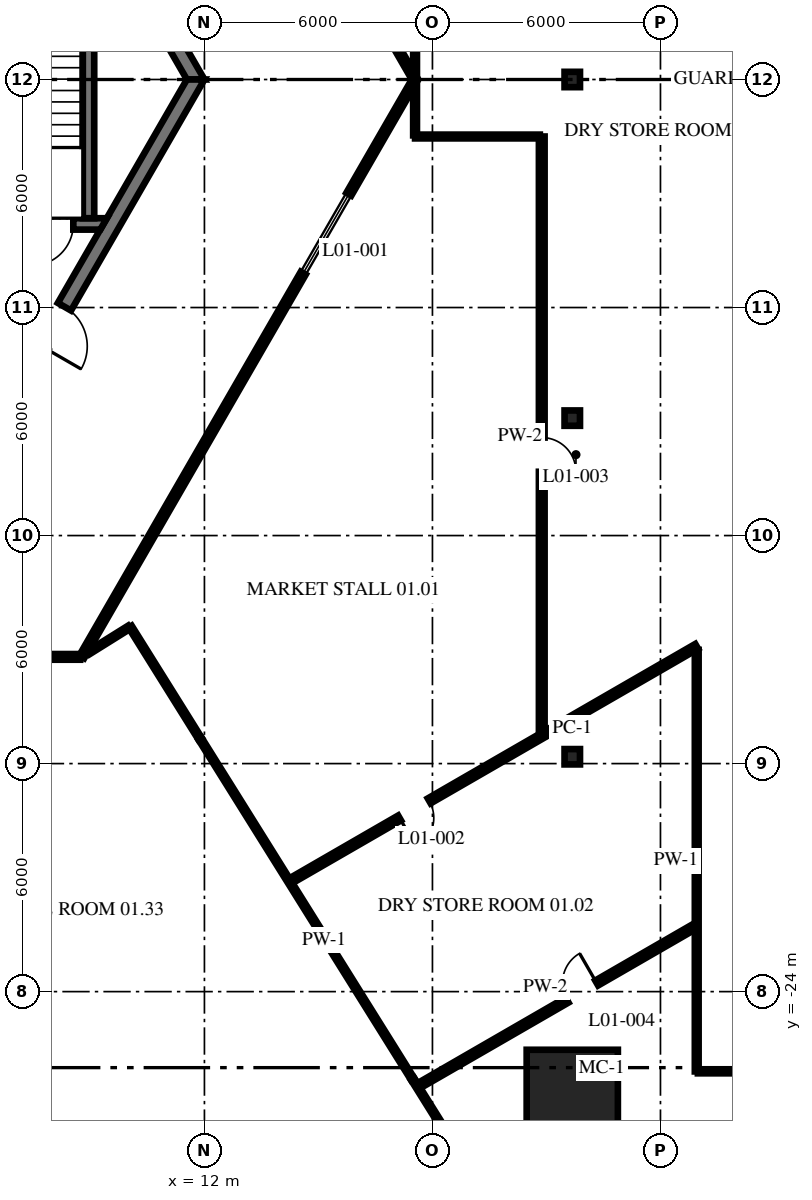
"""IFC4 building model, lengths in metres.
Left out: names, types, materials, properties, quantities, classifications, styles, units other than length and angle.
Written with IfcOpenShell. Run it as: python <this file> out.ifc"""

import sys

from ifc_helpers import new_model, si_unit, direction, frame, frame_2d, origin, origin_2d, place, context, subcontext, project, spatial, polyline, rectangle, i_section, outline, extrude, source, transform, mapped, element, fill, save


model = new_model("IFC4")
c1 = context("Model", 3, precision=1e-05, world=origin(), true_north=direction((0.0, 1.0)))
c2 = subcontext(c1, "Body", "Model", "MODEL_VIEW")
j1 = project(units=[si_unit("LENGTHUNIT", "METRE"), si_unit("PLANEANGLEUNIT", "RADIAN")], contexts=[c1])
p1 = place(None, origin())
s1 = spatial("IfcSite", under=j1, at=p1, CompositionType="ELEMENT")
p2 = place(p1, origin())
s2 = spatial("IfcBuilding", under=s1, at=p2, CompositionType="ELEMENT")
p3 = place(p2, frame((0.0, 0.0, 7.0)))
s3 = spatial("IfcBuildingStorey", under=s2, at=p3, CompositionType="ELEMENT", Elevation=7.0)
m1 = source(origin(), c2, "Body", "SweptSolid", [
    extrude(rectangle(XDim=2.4, YDim=2.4, at=origin_2d()), origin(), (0.0, 0.0, 1.0), 4.5),
])
p4 = place(p3, frame((21.679, -26.73, 0.0), z_axis=(0.0, 0.0, 1.0), x_axis=(0.0, 1.0, 0.0)))
e1 = element("IfcColumn", 1, at=p4, inside=s3, PredefinedType="COLUMN", context=c2, shape_type="MappedRepresentation", body=[
    mapped(m1, transform((0.0, 0.0, 0.0), scale=1.0)),
])
m2 = source(origin(), c2, "Body", "SweptSolid", [
    extrude(i_section(OverallWidth=0.404, OverallDepth=0.406, WebThickness=0.027, FlangeThickness=0.044, at=origin_2d()), origin(), (0.0, 0.0, 1.0), 4.5),
])
for number, where, z_axis, x_axis in (
    (2, (21.679, -17.82, 0.0), (0.0, 0.0, 1.0), (0.0, 1.0, 0.0)),
    (3, (21.679, -8.91, 0.0), (0.0, 0.0, 1.0), (0.0, 1.0, 0.0)),
    (4, (21.679, 0.0, 0.0), (0.0, 0.0, 1.0), (0.0, 1.0, 0.0)),
):
    element("IfcColumn", number, at=place(p3, frame(where, z_axis=z_axis, x_axis=x_axis)), inside=s3, PredefinedType="COLUMN", context=c2, shape_type="MappedRepresentation", body=[
        mapped(m2, transform((0.0, 0.0, 0.0), scale=1.0)),
    ])
m3 = source(origin(), c2, "Body", "SweptSolid", [
    extrude(outline(polyline([(-0.115, -0.2), (11.885, -0.2), (11.654, 0.2), (0.115, 0.2), (-0.115, -0.2)])), origin(), (0.0, 0.0, 1.0), 4.3),
])
p5 = place(p3, frame((11.769, 0.0, 0.0), z_axis=(0.0, 0.0, 1.0), x_axis=(-0.499996592174, 0.866027371285, 0.0)))
e5 = element("IfcWall", 5, at=p5, inside=s3, PredefinedType="SHEAR", context=c2, shape_type="MappedRepresentation", body=[
    mapped(m3, transform((0.0, 0.0, 0.0), scale=1.0)),
])
p6 = place(p5, frame((5.75, 0.0, 0.0)))
e6 = element("IfcOpeningElement", 6, at=p6, cuts=e5, PredefinedType="OPENING", context=c2, shape_type="SweptSolid", body=[
    extrude(rectangle(XDim=1.2, YDim=2.1, at=frame_2d((0.6, 1.05))), frame((0.0, 0.21, 0.0), z_axis=(0.0, -1.0, 0.0), x_axis=(1.0, 0.0, 0.0)), (0.0, 0.0, 1.0), 0.42),
])
p7 = place(p3, frame((5.885, -10.192, 0.0), z_axis=(0.0, 0.0, 1.0), x_axis=(0.499996592174, 0.866027371285, 0.0)))
e7 = element("IfcWall", 7, at=p7, inside=s3, PredefinedType="SHEAR", context=c2, shape_type="MappedRepresentation", body=[
    mapped(m3, transform((0.0, 0.0, 0.0), scale=1.0)),
])
p8 = place(p7, frame((3.665, 0.0, 0.0)))
e8 = element("IfcOpeningElement", 8, at=p8, cuts=e7, PredefinedType="OPENING", context=c2, shape_type="SweptSolid", body=[
    extrude(rectangle(XDim=1.2, YDim=2.1, at=frame_2d((0.6, 1.05))), frame((0.0, 0.21, 0.0), z_axis=(0.0, -1.0, 0.0), x_axis=(1.0, 0.0, 0.0)), (0.0, 0.0, 1.0), 0.42),
])
m4 = source(origin(), c2, "Body", "SweptSolid", [
    extrude(outline(polyline([(0.0, -0.15), (0.0, 0.15), (4.433, 0.15), (4.26, -0.15), (0.0, -0.15)])), origin(), (0.0, 0.0, 1.0), 4.3),
])
p9 = place(p3, frame((5.0, -3.8, 0.0), z_axis=(0.0, 0.0, 1.0), x_axis=(1.0, 0.0, 0.0)))
e9 = element("IfcWall", 9, at=p9, inside=s3, PredefinedType="SHEAR", context=c2, shape_type="MappedRepresentation", body=[
    mapped(m4, transform((0.0, 0.0, 0.0), scale=1.0)),
])
p10 = place(p9, frame((2.45, 0.0, 0.0)))
e10 = element("IfcOpeningElement", 10, at=p10, cuts=e9, PredefinedType="OPENING", context=c2, shape_type="SweptSolid", body=[
    extrude(rectangle(XDim=1.1, YDim=2.1, at=frame_2d((0.55, 1.05))), frame((0.0, 0.16, 0.0), z_axis=(0.0, -1.0, 0.0), x_axis=(1.0, 0.0, 0.0)), (0.0, 0.0, 1.0), 0.32),
])
m5 = source(origin(), c2, "Body", "SweptSolid", [
    extrude(rectangle(XDim=7.3, YDim=0.3, at=frame_2d((3.65, 0.0))), origin(), (0.0, 0.0, 1.0), 4.3),
])
p11 = place(p3, frame((8.95, -3.65, 0.0), z_axis=(0.0, 0.0, 1.0), x_axis=(0.0, 1.0, 0.0)))
e11 = element("IfcWall", 11, at=p11, inside=s3, PredefinedType="SHEAR", context=c2, shape_type="MappedRepresentation", body=[
    mapped(m5, transform((0.0, 0.0, 0.0), scale=1.0)),
])
p12 = place(p3, frame((8.792, 15.156, 0.0), z_axis=(0.0, 0.0, 1.0), x_axis=(0.499996830835, -0.866027233495, 0.0)))
e12 = element("IfcWall", 12, at=p12, inside=s3, PredefinedType="PARTITIONING", context=c2, shape_type="SweptSolid", body=[
    extrude(rectangle(XDim=17.458, YDim=0.15, at=frame_2d((8.729, 0.0))), origin(), (0.0, 0.0, 1.0), 4.3),
])
p13 = place(p12, frame((11.551, 0.0, 0.0)))
e13 = element("IfcOpeningElement", 13, at=p13, cuts=e12, PredefinedType="OPENING", context=c2, shape_type="SweptSolid", body=[
    extrude(rectangle(XDim=2.4, YDim=2.4, at=frame_2d((1.2, 1.2))), frame((0.0, 0.085, 0.0), z_axis=(0.0, -1.0, 0.0), x_axis=(1.0, 0.0, 0.0)), (0.0, 0.0, 1.0), 0.17),
])
p14 = place(p12, frame((2.014, 0.0, 0.0)))
e14 = element("IfcOpeningElement", 14, at=p14, cuts=e12, PredefinedType="OPENING", context=c2, shape_type="SweptSolid", body=[
    extrude(rectangle(XDim=0.9, YDim=2.1, at=frame_2d((0.45, 1.05))), frame((0.0, 0.085, 0.0), z_axis=(0.0, -1.0, 0.0), x_axis=(1.0, 0.0, 0.0)), (0.0, 0.0, 1.0), 0.17),
])
p15 = place(p12, frame((6.117, 0.0, 0.0)))
e15 = element("IfcOpeningElement", 15, at=p15, cuts=e12, PredefinedType="OPENING", context=c2, shape_type="SweptSolid", body=[
    extrude(rectangle(XDim=0.9, YDim=2.1, at=frame_2d((0.45, 1.05))), frame((0.0, 0.085, 0.0), z_axis=(0.0, -1.0, 0.0), x_axis=(1.0, 0.0, 0.0)), (0.0, 0.0, 1.0), 0.17),
])
p16 = place(p3, frame((10.043, -14.398, 0.0), z_axis=(0.0, 0.0, 1.0), x_axis=(0.529778164717, -0.8481362486, 0.0)))
e16 = element("IfcWall", 16, at=p16, inside=s3, PredefinedType="PARTITIONING", context=c2, shape_type="SweptSolid", body=[
    extrude(rectangle(XDim=3.479, YDim=0.1, at=frame_2d((1.74, 0.0))), origin(), (0.0, 0.0, 1.0), 4.3),
])
p17 = place(p3, frame((11.887, -17.349, 0.0), z_axis=(0.0, 0.0, 1.0), x_axis=(0.529793111174, -0.848126912291, 0.0)))
e17 = element("IfcWall", 17, at=p17, inside=s3, PredefinedType="PARTITIONING", context=c2, shape_type="SweptSolid", body=[
    extrude(rectangle(XDim=10.556, YDim=0.1, at=frame_2d((5.278, 0.0))), origin(), (0.0, 0.0, 1.0), 3.543),
])
p18 = place(p3, frame((17.479, -26.302, 0.0), z_axis=(0.0, 0.0, 1.0), x_axis=(0.52978836467, -0.848129877236, 0.0)))
e18 = element("IfcWall", 18, at=p18, inside=s3, PredefinedType="PARTITIONING", context=c2, shape_type="SweptSolid", body=[
    extrude(rectangle(XDim=6.253, YDim=0.1, at=frame_2d((3.127, 0.0))), origin(), (0.0, 0.0, 1.0), 4.3),
])
m6 = source(origin(), c2, "Body", "SweptSolid", [
    extrude(rectangle(XDim=6.395, YDim=0.1, at=frame_2d((3.198, 0.0))), origin(), (0.0, 0.0, 1.0), 4.3),
])
p19 = place(p3, frame((24.984, -26.1, 0.0), z_axis=(0.0, 0.0, 1.0), x_axis=(1.0, 0.0, 0.0)))
e19 = element("IfcWall", 19, at=p19, inside=s3, PredefinedType="PARTITIONING", context=c2, shape_type="MappedRepresentation", body=[
    mapped(m6, transform((0.0, 0.0, 0.0), scale=1.0)),
])
p20 = place(p3, frame((-8.721, -15.192, 0.0), z_axis=(0.0, 0.0, 1.0), x_axis=(1.0, 0.0, 0.0)))
e20 = element("IfcWall", 20, at=p20, inside=s3, PredefinedType="PARTITIONING", context=c2, shape_type="SweptSolid", body=[
    extrude(rectangle(XDim=17.451, YDim=0.15, at=frame_2d((8.725, 0.0))), origin(), (0.0, 0.0, 1.0), 4.3),
])
p21 = place(p20, frame((4.226, 0.0, 0.0)))
e21 = element("IfcOpeningElement", 21, at=p21, cuts=e20, PredefinedType="OPENING", context=c2, shape_type="SweptSolid", body=[
    extrude(rectangle(XDim=1.8, YDim=2.4, at=frame_2d((0.9, 1.2))), frame((0.0, 0.085, 0.0), z_axis=(0.0, -1.0, 0.0), x_axis=(1.0, 0.0, 0.0)), (0.0, 0.0, 1.0), 0.17),
])
p22 = place(p20, frame((10.434, 0.0, 0.0)))
e22 = element("IfcOpeningElement", 22, at=p22, cuts=e20, PredefinedType="OPENING", context=c2, shape_type="SweptSolid", body=[
    extrude(rectangle(XDim=0.9, YDim=2.1, at=frame_2d((0.45, 1.05))), frame((0.0, 0.085, 0.0), z_axis=(0.0, -1.0, 0.0), x_axis=(1.0, 0.0, 0.0)), (0.0, 0.0, 1.0), 0.17),
])
p23 = place(p20, frame((14.536, 0.0, 0.0)))
e23 = element("IfcOpeningElement", 23, at=p23, cuts=e20, PredefinedType="OPENING", context=c2, shape_type="SweptSolid", body=[
    extrude(rectangle(XDim=0.9, YDim=2.1, at=frame_2d((0.45, 1.05))), frame((0.0, 0.085, 0.0), z_axis=(0.0, -1.0, 0.0), x_axis=(1.0, 0.0, 0.0)), (0.0, 0.0, 1.0), 0.17),
])
p24 = place(p3, frame((17.542, -1.5, 0.0), z_axis=(0.0, 0.0, 1.0), x_axis=(1.0, 0.0, 0.0)))
e24 = element("IfcWall", 24, at=p24, inside=s3, PredefinedType="PARTITIONING", context=c2, shape_type="SweptSolid", body=[
    extrude(rectangle(XDim=3.284, YDim=0.1, at=frame_2d((1.642, 0.0))), origin(), (0.0, 0.0, 1.0), 4.3),
])
p25 = place(p3, frame((17.628, -26.483, 0.0), z_axis=(0.0, 0.0, 1.0), x_axis=(0.866027414801, 0.499996516801, 0.0)))
e25 = element("IfcWall", 25, at=p25, inside=s3, PredefinedType="PARTITIONING", context=c2, shape_type="SweptSolid", body=[
    extrude(rectangle(XDim=8.379, YDim=0.15, at=frame_2d((4.19, 0.0))), origin(), (0.0, 0.0, 1.0), 4.3),
])
p26 = place(p25, frame((4.52, 0.0, 0.0)))
e26 = element("IfcOpeningElement", 26, at=p26, cuts=e25, PredefinedType="OPENING", context=c2, shape_type="SweptSolid", body=[
    extrude(rectangle(XDim=0.9, YDim=2.1, at=frame_2d((0.45, 1.05))), frame((0.0, 0.085, 0.0), z_axis=(0.0, -1.0, 0.0), x_axis=(1.0, 0.0, 0.0)), (0.0, 0.0, 1.0), 0.17),
])
p27 = place(p3, frame((14.26, -21.092, 0.0), z_axis=(0.0, 0.0, 1.0), x_axis=(0.866027554198, 0.499996275356, 0.0)))
e27 = element("IfcWall", 27, at=p27, inside=s3, PredefinedType="PARTITIONING", context=c2, shape_type="SweptSolid", body=[
    extrude(rectangle(XDim=12.349, YDim=0.15, at=frame_2d((6.174, 0.0))), origin(), (0.0, 0.0, 1.0), 4.3),
])
p28 = place(p27, frame((3.32, 0.0, 0.0)))
e28 = element("IfcOpeningElement", 28, at=p28, cuts=e27, PredefinedType="OPENING", context=c2, shape_type="SweptSolid", body=[
    extrude(rectangle(XDim=0.9, YDim=2.1, at=frame_2d((0.45, 1.05))), frame((0.0, 0.085, 0.0), z_axis=(0.0, -1.0, 0.0), x_axis=(1.0, 0.0, 0.0)), (0.0, 0.0, 1.0), 0.17),
])
p29 = place(p3, frame((8.949, -15.081, 0.0), z_axis=(0.0, 0.0, 1.0), x_axis=(0.848139792609, 0.529772490974, 0.0)))
e29 = element("IfcWall", 29, at=p29, inside=s3, PredefinedType="PARTITIONING", context=c2, shape_type="SweptSolid", body=[
    extrude(rectangle(XDim=1.26, YDim=0.1, at=frame_2d((0.63, 0.0))), origin(), (0.0, 0.0, 1.0), 4.3),
])
p30 = place(p3, frame((8.772, -15.191, 0.0), z_axis=(0.0, 0.0, 1.0), x_axis=(0.499997184852, 0.866027029105, 0.0)))
e30 = element("IfcWall", 30, at=p30, inside=s3, PredefinedType="PARTITIONING", context=c2, shape_type="SweptSolid", body=[
    extrude(rectangle(XDim=17.539, YDim=0.15, at=frame_2d((8.769, 0.0))), origin(), (0.0, 0.0, 1.0), 4.3),
])
p31 = place(p30, frame((11.657, 0.0, 0.0)))
e31 = element("IfcOpeningElement", 31, at=p31, cuts=e30, PredefinedType="OPENING", context=c2, shape_type="SweptSolid", body=[
    extrude(rectangle(XDim=2.4, YDim=2.4, at=frame_2d((1.2, 1.2))), frame((0.0, 0.085, 0.0), z_axis=(0.0, -1.0, 0.0), x_axis=(1.0, 0.0, 0.0)), (0.0, 0.0, 1.0), 0.17),
])
p32 = place(p3, frame((24.954, -26.1, 0.0), z_axis=(0.0, 0.0, 1.0), x_axis=(0.0, 1.0, 0.0)))
e32 = element("IfcWall", 32, at=p32, inside=s3, PredefinedType="PARTITIONING", context=c2, shape_type="SweptSolid", body=[
    extrude(rectangle(XDim=11.093, YDim=0.1, at=frame_2d((5.546, 0.0))), origin(), (0.0, 0.0, 1.0), 4.3),
])
p33 = place(p3, frame((20.876, -17.271, 0.0), z_axis=(0.0, 0.0, 1.0), x_axis=(0.0, 1.0, 0.0)))
e33 = element("IfcWall", 33, at=p33, inside=s3, PredefinedType="PARTITIONING", context=c2, shape_type="SweptSolid", body=[
    extrude(rectangle(XDim=15.771, YDim=0.15, at=frame_2d((7.886, 0.0))), origin(), (0.0, 0.0, 1.0), 4.3),
])
p34 = place(p33, frame((6.95, 0.0, 0.0)))
e34 = element("IfcOpeningElement", 34, at=p34, cuts=e33, PredefinedType="OPENING", context=c2, shape_type="SweptSolid", body=[
    extrude(rectangle(XDim=0.9, YDim=2.1, at=frame_2d((0.45, 1.05))), frame((0.0, 0.085, 0.0), z_axis=(0.0, -1.0, 0.0), x_axis=(1.0, 0.0, 0.0)), (0.0, 0.0, 1.0), 0.17),
])
p35 = place(p3, frame((17.542, -1.47, 0.0), z_axis=(0.0, 0.0, 1.0), x_axis=(0.0, 1.0, 0.0)))
e35 = element("IfcWall", 35, at=p35, inside=s3, PredefinedType="PARTITIONING", context=c2, shape_type="SweptSolid", body=[
    extrude(rectangle(XDim=2.94, YDim=0.1, at=frame_2d((1.47, 0.0))), origin(), (0.0, 0.0, 1.0), 4.3),
])
p36 = place(p8, frame((1.2, 0.0, 0.0), z_axis=(0.0, 0.0, 1.0), x_axis=(-1.0, 0.0, 0.0)))
e36 = element("IfcDoor", 36, at=p36, inside=s3, OperationType="SINGLE_SWING_RIGHT", PredefinedType="DOOR", context=c2, shape_type="SweptSolid", body=[
    extrude(rectangle(XDim=1.2, YDim=2.1, at=frame_2d((0.6, 1.05))), frame((0.0, 0.025, 0.0), z_axis=(0.0, -1.0, 0.0), x_axis=(1.0, 0.0, 0.0)), (0.0, 0.0, 1.0), 0.05),
])
fill(e8, e36)
p37 = place(p10, frame((1.1, 0.0, 0.0), z_axis=(0.0, 0.0, 1.0), x_axis=(-1.0, 0.0, 0.0)))
e37 = element("IfcDoor", 37, at=p37, inside=s3, OperationType="SINGLE_SWING_RIGHT", PredefinedType="DOOR", context=c2, shape_type="SweptSolid", body=[
    extrude(rectangle(XDim=1.1, YDim=2.1, at=frame_2d((0.55, 1.05))), frame((0.0, 0.025, 0.0), z_axis=(0.0, -1.0, 0.0), x_axis=(1.0, 0.0, 0.0)), (0.0, 0.0, 1.0), 0.05),
])
fill(e10, e37)
p38 = place(p31, origin())
e38 = element("IfcDoor", 38, at=p38, inside=s3, OperationType="ROLLINGUP", PredefinedType="DOOR", context=c2, shape_type="SweptSolid", body=[
    extrude(rectangle(XDim=2.4, YDim=2.4, at=frame_2d((1.2, 1.2))), frame((0.0, 0.025, 0.0), z_axis=(0.0, -1.0, 0.0), x_axis=(1.0, 0.0, 0.0)), (0.0, 0.0, 1.0), 0.05),
])
fill(e31, e38)
p39 = place(p28, origin())
e39 = element("IfcDoor", 39, at=p39, inside=s3, OperationType="SINGLE_SWING_RIGHT", PredefinedType="DOOR", context=c2, shape_type="SweptSolid", body=[
    extrude(rectangle(XDim=0.9, YDim=2.1, at=frame_2d((0.45, 1.05))), frame((0.0, 0.025, 0.0), z_axis=(0.0, -1.0, 0.0), x_axis=(1.0, 0.0, 0.0)), (0.0, 0.0, 1.0), 0.05),
])
fill(e28, e39)
p40 = place(p34, origin())
e40 = element("IfcDoor", 40, at=p40, inside=s3, OperationType="SINGLE_SWING_RIGHT", PredefinedType="DOOR", context=c2, shape_type="SweptSolid", body=[
    extrude(rectangle(XDim=0.9, YDim=2.1, at=frame_2d((0.45, 1.05))), frame((0.0, 0.025, 0.0), z_axis=(0.0, -1.0, 0.0), x_axis=(1.0, 0.0, 0.0)), (0.0, 0.0, 1.0), 0.05),
])
fill(e34, e40)
p41 = place(p26, origin())
e41 = element("IfcDoor", 41, at=p41, inside=s3, OperationType="SINGLE_SWING_LEFT", PredefinedType="DOOR", context=c2, shape_type="SweptSolid", body=[
    extrude(rectangle(XDim=0.9, YDim=2.1, at=frame_2d((0.45, 1.05))), frame((0.0, 0.025, 0.0), z_axis=(0.0, -1.0, 0.0), x_axis=(1.0, 0.0, 0.0)), (0.0, 0.0, 1.0), 0.05),
])
fill(e26, e41)
save(model, sys.argv[1])
